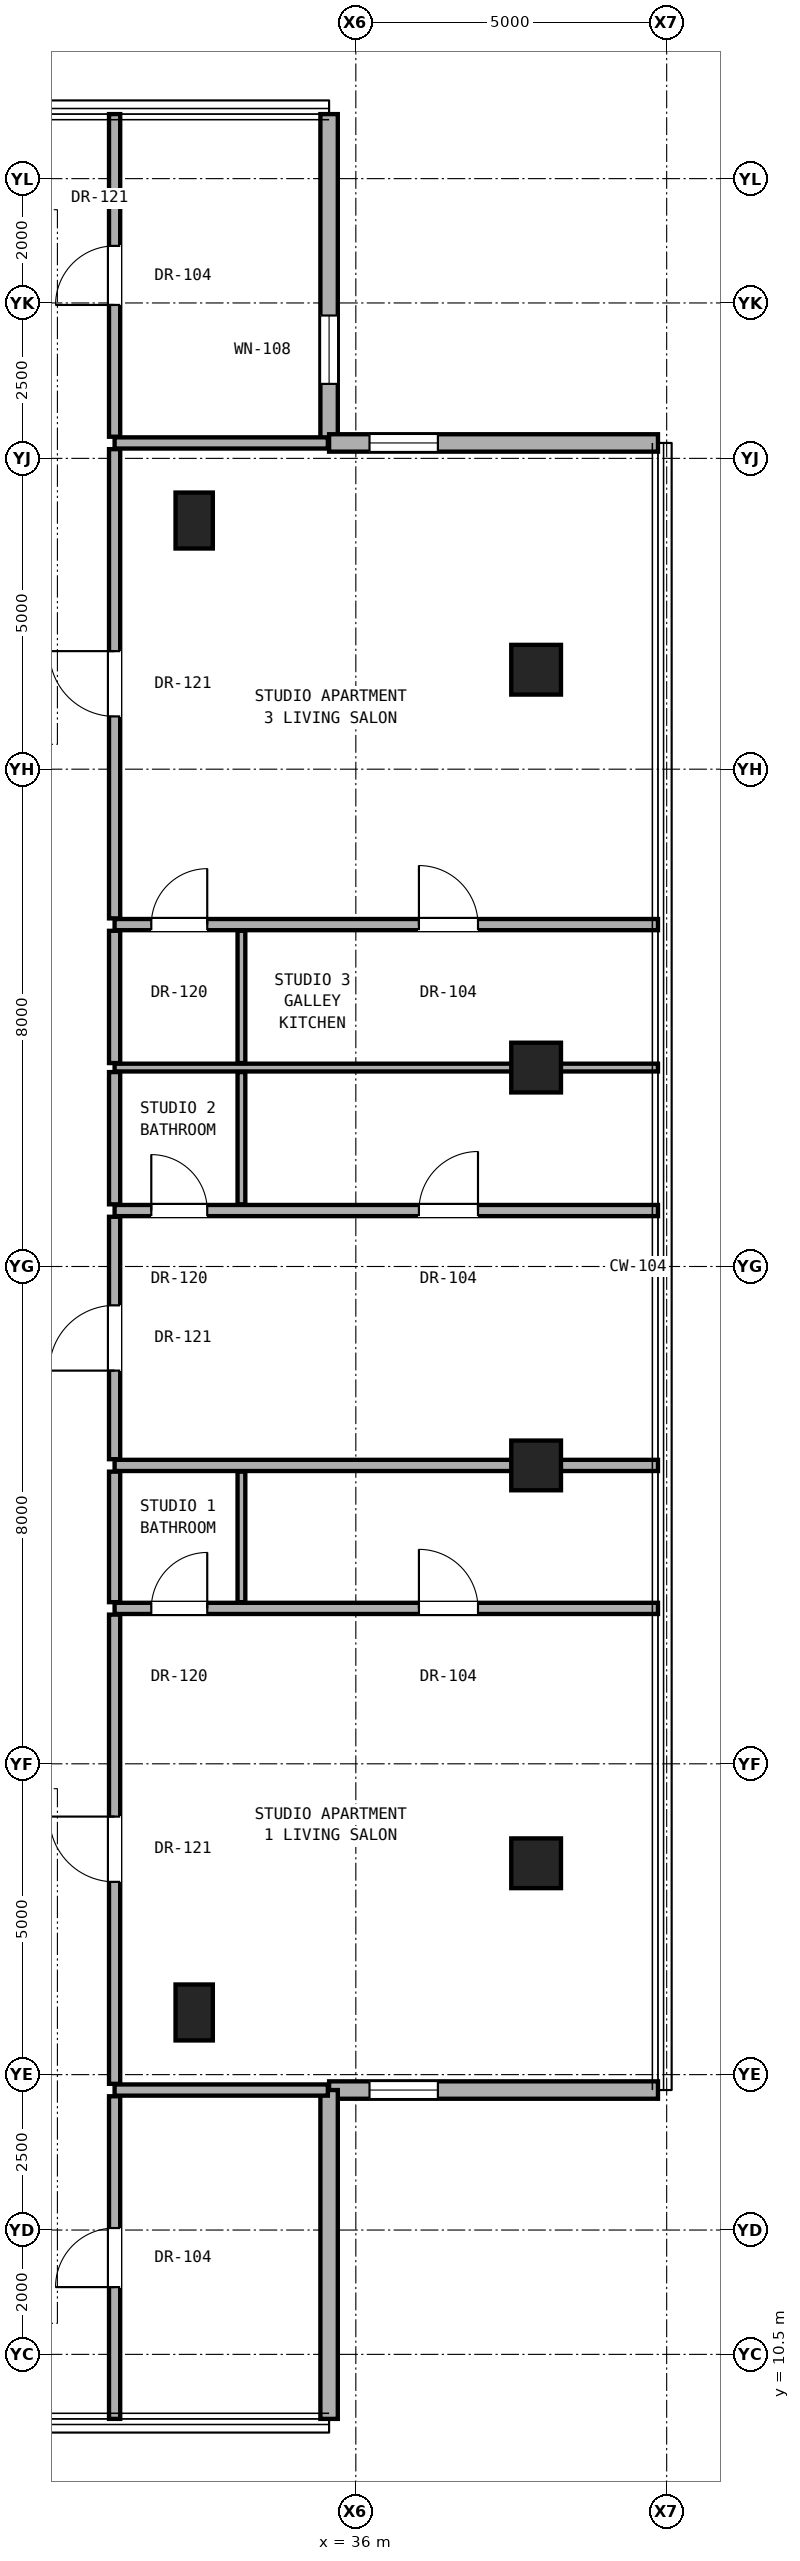
"""IFC4 building model, lengths in metres.
Left out: names, types, materials, properties, quantities, classifications, styles, units other than length and angle.
Written with IfcOpenShell. Run it as: python <this file> out.ifc"""

import sys

from ifc_helpers import new_model, si_unit, direction, frame, frame_2d, origin, origin_2d, place, context, subcontext, project, spatial, rectangle, hollow_rectangle, extrude, element, fill, save


model = new_model("IFC4")
c1 = context("Model", 3, precision=1e-05, world=origin(), true_north=direction((0.0, 1.0)))
c2 = subcontext(c1, "Body", "Model", "MODEL_VIEW")
j1 = project(units=[si_unit("LENGTHUNIT", "METRE"), si_unit("PLANEANGLEUNIT", "RADIAN")], contexts=[c1])
p1 = place(None, origin())
s1 = spatial("IfcSite", under=j1, at=p1, CompositionType="ELEMENT")
p2 = place(p1, origin())
s2 = spatial("IfcBuilding", under=s1, at=p2, CompositionType="ELEMENT")
p3 = place(p2, frame((0.0, 0.0, 222.7)))
s3 = spatial("IfcBuildingStorey", under=s2, at=p3, CompositionType="ELEMENT", Elevation=222.7)
for number, where, z_axis, x_axis in (
    (1, (38.9, 18.4, 0.0), (0.0, 0.0, 1.0), (1.0, 0.0, 0.0)),
    (2, (38.9, 24.8, 0.0), (0.0, 0.0, 1.0), (1.0, 0.0, 0.0)),
    (3, (38.9, 31.2, 0.0), (0.0, 0.0, 1.0), (1.0, 0.0, 0.0)),
    (4, (38.9, 37.6, 0.0), (0.0, 0.0, 1.0), (1.0, 0.0, 0.0)),
):
    element("IfcColumn", number, at=place(p3, frame(where, z_axis=z_axis, x_axis=x_axis)), inside=s3, PredefinedType="COLUMN", context=c2, shape_type="SweptSolid", body=[
        extrude(hollow_rectangle(XDim=0.8, YDim=0.8, WallThickness=0.045, at=origin_2d()), origin(), (0.0, 0.0, 1.0), 3.3),
    ])
for number, where, z_axis, x_axis in (
    (5, (33.4, 16.0, 0.0), (0.0, 0.0, 1.0), (1.0, 0.0, 0.0)),
    (6, (33.4, 40.0, 0.0), (0.0, 0.0, 1.0), (1.0, 0.0, 0.0)),
):
    element("IfcColumn", number, at=place(p3, frame(where, z_axis=z_axis, x_axis=x_axis)), inside=s3, PredefinedType="PILASTER", context=c2, shape_type="SweptSolid", body=[
        extrude(rectangle(XDim=0.6, YDim=0.9, at=origin_2d()), origin(), (0.0, 0.0, 1.0), 3.3),
    ])
p4 = place(p3, frame((35.57, 41.248, 0.0), z_axis=(0.0, 0.0, 1.0), x_axis=(0.0, 1.0, 0.0)))
e7 = element("IfcWall", 7, at=p4, inside=s3, PredefinedType="SOLIDWALL", context=c2, shape_type="SweptSolid", body=[
    extrude(rectangle(XDim=5.29, YDim=0.28, at=frame_2d((2.645, 0.0))), origin(), (0.0, 0.0, 1.0), 3.08),
])
p5 = place(p4, frame((0.95, 0.0, 0.85)))
e8 = element("IfcOpeningElement", 8, at=p5, cuts=e7, PredefinedType="OPENING", context=c2, shape_type="SweptSolid", body=[
    extrude(rectangle(XDim=1.1, YDim=2.0, at=frame_2d((0.55, 1.0))), frame((0.0, 0.15, 0.0), z_axis=(0.0, -1.0, 0.0), x_axis=(1.0, 0.0, 0.0)), (0.0, 0.0, 1.0), 0.3),
])
p6 = place(p3, frame((35.57, 14.752, 0.0), z_axis=(0.0, 0.0, 1.0), x_axis=(1.0, 0.0, 0.0)))
e9 = element("IfcWall", 9, at=p6, inside=s3, PredefinedType="SOLIDWALL", context=c2, shape_type="SweptSolid", body=[
    extrude(rectangle(XDim=5.29, YDim=0.28, at=frame_2d((2.645, 0.0))), origin(), (0.0, 0.0, 1.0), 3.08),
])
p7 = place(p6, frame((0.65, 0.0, 0.85)))
e10 = element("IfcOpeningElement", 10, at=p7, cuts=e9, PredefinedType="OPENING", context=c2, shape_type="SweptSolid", body=[
    extrude(rectangle(XDim=1.1, YDim=2.0, at=frame_2d((0.55, 1.0))), frame((0.0, 0.15, 0.0), z_axis=(0.0, -1.0, 0.0), x_axis=(1.0, 0.0, 0.0)), (0.0, 0.0, 1.0), 0.3),
])
p8 = place(p3, frame((35.57, 9.462, 0.0), z_axis=(0.0, 0.0, 1.0), x_axis=(0.0, 1.0, 0.0)))
e11 = element("IfcWall", 11, at=p8, inside=s3, PredefinedType="SOLIDWALL", context=c2, shape_type="SweptSolid", body=[
    extrude(rectangle(XDim=5.29, YDim=0.28, at=frame_2d((2.645, 0.0))), origin(), (0.0, 0.0, 1.0), 3.08),
])
p9 = place(p3, frame((40.86, 41.248, 0.0), z_axis=(0.0, 0.0, 1.0), x_axis=(-1.0, 0.0, 0.0)))
e12 = element("IfcWall", 12, at=p9, inside=s3, PredefinedType="SOLIDWALL", context=c2, shape_type="SweptSolid", body=[
    extrude(rectangle(XDim=5.29, YDim=0.28, at=frame_2d((2.645, 0.0))), origin(), (0.0, 0.0, 1.0), 3.08),
])
p10 = place(p9, frame((3.54, 0.0, 0.85)))
e13 = element("IfcOpeningElement", 13, at=p10, cuts=e12, PredefinedType="OPENING", context=c2, shape_type="SweptSolid", body=[
    extrude(rectangle(XDim=1.1, YDim=2.0, at=frame_2d((0.55, 1.0))), frame((0.0, 0.15, 0.0), z_axis=(0.0, -1.0, 0.0), x_axis=(1.0, 0.0, 0.0)), (0.0, 0.0, 1.0), 0.3),
])
p11 = place(p3, frame((32.12, 14.752, 0.0), z_axis=(0.0, 0.0, 1.0), x_axis=(1.0, 0.0, 0.0)))
e14 = element("IfcWall", 14, at=p11, inside=s3, PredefinedType="PARTITIONING", context=c2, shape_type="SweptSolid", body=[
    extrude(rectangle(XDim=3.43, YDim=0.18, at=frame_2d((1.715, 0.0))), origin(), (0.0, 0.0, 1.0), 3.1),
])
p12 = place(p3, frame((32.12, 22.5, 0.0), z_axis=(0.0, 0.0, 1.0), x_axis=(1.0, 0.0, 0.0)))
e15 = element("IfcWall", 15, at=p12, inside=s3, PredefinedType="PARTITIONING", context=c2, shape_type="SweptSolid", body=[
    extrude(rectangle(XDim=8.74, YDim=0.18, at=frame_2d((4.37, 0.0))), origin(), (0.0, 0.0, 1.0), 2.319),
])
p13 = place(p12, frame((4.895, 0.0, 0.0)))
e16 = element("IfcOpeningElement", 16, at=p13, cuts=e15, PredefinedType="OPENING", context=c2, shape_type="SweptSolid", body=[
    extrude(rectangle(XDim=0.95, YDim=2.15, at=frame_2d((0.475, 1.075))), frame((0.0, 0.1, 0.0), z_axis=(0.0, -1.0, 0.0), x_axis=(1.0, 0.0, 0.0)), (0.0, 0.0, 1.0), 0.2),
])
p14 = place(p12, frame((0.59, 0.0, 0.0)))
e17 = element("IfcOpeningElement", 17, at=p14, cuts=e15, PredefinedType="OPENING", context=c2, shape_type="SweptSolid", body=[
    extrude(rectangle(XDim=0.9, YDim=2.1, at=frame_2d((0.45, 1.05))), frame((0.0, 0.1, 0.0), z_axis=(0.0, -1.0, 0.0), x_axis=(1.0, 0.0, 0.0)), (0.0, 0.0, 1.0), 0.2),
])
p15 = place(p3, frame((32.12, 24.8, 0.0), z_axis=(0.0, 0.0, 1.0), x_axis=(1.0, 0.0, 0.0)))
e18 = element("IfcWall", 18, at=p15, inside=s3, PredefinedType="PARTITIONING", context=c2, shape_type="SweptSolid", body=[
    extrude(rectangle(XDim=8.74, YDim=0.18, at=frame_2d((4.37, 0.0))), origin(), (0.0, 0.0, 1.0), 2.319),
])
p16 = place(p3, frame((32.12, 28.9, 0.0), z_axis=(0.0, 0.0, 1.0), x_axis=(1.0, 0.0, 0.0)))
e19 = element("IfcWall", 19, at=p16, inside=s3, PredefinedType="PARTITIONING", context=c2, shape_type="SweptSolid", body=[
    extrude(rectangle(XDim=8.74, YDim=0.18, at=frame_2d((4.37, 0.0))), origin(), (0.0, 0.0, 1.0), 2.319),
])
p17 = place(p16, frame((4.895, 0.0, 0.0)))
e20 = element("IfcOpeningElement", 20, at=p17, cuts=e19, PredefinedType="OPENING", context=c2, shape_type="SweptSolid", body=[
    extrude(rectangle(XDim=0.95, YDim=2.15, at=frame_2d((0.475, 1.075))), frame((0.0, 0.1, 0.0), z_axis=(0.0, -1.0, 0.0), x_axis=(1.0, 0.0, 0.0)), (0.0, 0.0, 1.0), 0.2),
])
p18 = place(p16, frame((0.59, 0.0, 0.0)))
e21 = element("IfcOpeningElement", 21, at=p18, cuts=e19, PredefinedType="OPENING", context=c2, shape_type="SweptSolid", body=[
    extrude(rectangle(XDim=0.9, YDim=2.1, at=frame_2d((0.45, 1.05))), frame((0.0, 0.1, 0.0), z_axis=(0.0, -1.0, 0.0), x_axis=(1.0, 0.0, 0.0)), (0.0, 0.0, 1.0), 0.2),
])
p19 = place(p3, frame((32.12, 31.2, 0.0), z_axis=(0.0, 0.0, 1.0), x_axis=(1.0, 0.0, 0.0)))
e22 = element("IfcWall", 22, at=p19, inside=s3, PredefinedType="PARTITIONING", context=c2, shape_type="SweptSolid", body=[
    extrude(rectangle(XDim=8.74, YDim=0.125, at=frame_2d((4.37, 0.0))), origin(), (0.0, 0.0, 1.0), 2.319),
])
p20 = place(p3, frame((32.12, 33.5, 0.0), z_axis=(0.0, 0.0, 1.0), x_axis=(1.0, 0.0, 0.0)))
e23 = element("IfcWall", 23, at=p20, inside=s3, PredefinedType="PARTITIONING", context=c2, shape_type="SweptSolid", body=[
    extrude(rectangle(XDim=8.74, YDim=0.18, at=frame_2d((4.37, 0.0))), origin(), (0.0, 0.0, 1.0), 2.319),
])
p21 = place(p20, frame((4.895, 0.0, 0.0)))
e24 = element("IfcOpeningElement", 24, at=p21, cuts=e23, PredefinedType="OPENING", context=c2, shape_type="SweptSolid", body=[
    extrude(rectangle(XDim=0.95, YDim=2.15, at=frame_2d((0.475, 1.075))), frame((0.0, 0.1, 0.0), z_axis=(0.0, -1.0, 0.0), x_axis=(1.0, 0.0, 0.0)), (0.0, 0.0, 1.0), 0.2),
])
p22 = place(p20, frame((0.59, 0.0, 0.0)))
e25 = element("IfcOpeningElement", 25, at=p22, cuts=e23, PredefinedType="OPENING", context=c2, shape_type="SweptSolid", body=[
    extrude(rectangle(XDim=0.9, YDim=2.1, at=frame_2d((0.45, 1.05))), frame((0.0, 0.1, 0.0), z_axis=(0.0, -1.0, 0.0), x_axis=(1.0, 0.0, 0.0)), (0.0, 0.0, 1.0), 0.2),
])
p23 = place(p3, frame((32.12, 41.248, 0.0), z_axis=(0.0, 0.0, 1.0), x_axis=(1.0, 0.0, 0.0)))
e26 = element("IfcWall", 26, at=p23, inside=s3, PredefinedType="PARTITIONING", context=c2, shape_type="SweptSolid", body=[
    extrude(rectangle(XDim=3.43, YDim=0.18, at=frame_2d((1.715, 0.0))), origin(), (0.0, 0.0, 1.0), 3.1),
])
p24 = place(p3, frame((32.12, 9.462, 0.0), z_axis=(0.0, 0.0, 1.0), x_axis=(0.0, 1.0, 0.0)))
e27 = element("IfcWall", 27, at=p24, inside=s3, PredefinedType="PARTITIONING", context=c2, shape_type="SweptSolid", body=[
    extrude(rectangle(XDim=5.19, YDim=0.18, at=frame_2d((2.595, 0.0))), origin(), (0.0, 0.0, 1.0), 3.1),
])
p25 = place(p24, frame((2.12, 0.0, 0.0)))
e28 = element("IfcOpeningElement", 28, at=p25, cuts=e27, PredefinedType="OPENING", context=c2, shape_type="SweptSolid", body=[
    extrude(rectangle(XDim=0.95, YDim=2.15, at=frame_2d((0.475, 1.075))), frame((0.0, 0.1, 0.0), z_axis=(0.0, -1.0, 0.0), x_axis=(1.0, 0.0, 0.0)), (0.0, 0.0, 1.0), 0.2),
])
p26 = place(p3, frame((32.12, 14.852, 0.0), z_axis=(0.0, 0.0, 1.0), x_axis=(0.0, 1.0, 0.0)))
e29 = element("IfcWall", 29, at=p26, inside=s3, PredefinedType="PARTITIONING", context=c2, shape_type="SweptSolid", body=[
    extrude(rectangle(XDim=7.548, YDim=0.18, at=frame_2d((3.774, 0.0))), origin(), (0.0, 0.0, 1.0), 2.492),
])
p27 = place(p26, frame((3.249, 0.0, 0.0)))
e30 = element("IfcOpeningElement", 30, at=p27, cuts=e29, PredefinedType="OPENING", context=c2, shape_type="SweptSolid", body=[
    extrude(rectangle(XDim=1.05, YDim=2.2, at=frame_2d((0.525, 1.1))), frame((0.0, 0.1, 0.0), z_axis=(0.0, -1.0, 0.0), x_axis=(1.0, 0.0, 0.0)), (0.0, 0.0, 1.0), 0.2),
])
p28 = place(p3, frame((32.12, 22.6, 0.0), z_axis=(0.0, 0.0, 1.0), x_axis=(0.0, 1.0, 0.0)))
e31 = element("IfcWall", 31, at=p28, inside=s3, PredefinedType="PARTITIONING", context=c2, shape_type="SweptSolid", body=[
    extrude(rectangle(XDim=2.1, YDim=0.18, at=frame_2d((1.05, 0.0))), origin(), (0.0, 0.0, 1.0), 2.396),
])
p29 = place(p3, frame((32.12, 24.9, 0.0), z_axis=(0.0, 0.0, 1.0), x_axis=(0.0, 1.0, 0.0)))
e32 = element("IfcWall", 32, at=p29, inside=s3, PredefinedType="PARTITIONING", context=c2, shape_type="SweptSolid", body=[
    extrude(rectangle(XDim=3.9, YDim=0.18, at=frame_2d((1.95, 0.0))), origin(), (0.0, 0.0, 1.0), 2.396),
])
p30 = place(p29, frame((1.425, 0.0, 0.0)))
e33 = element("IfcOpeningElement", 33, at=p30, cuts=e32, PredefinedType="OPENING", context=c2, shape_type="SweptSolid", body=[
    extrude(rectangle(XDim=1.05, YDim=2.2, at=frame_2d((0.525, 1.1))), frame((0.0, 0.1, 0.0), z_axis=(0.0, -1.0, 0.0), x_axis=(1.0, 0.0, 0.0)), (0.0, 0.0, 1.0), 0.2),
])
for number, where, z_axis, x_axis in (
    (34, (32.12, 29.0, 0.0), (0.0, 0.0, 1.0), (0.0, 1.0, 0.0)),
    (35, (32.12, 31.272, 0.0), (0.0, 0.0, 1.0), (0.0, 1.0, 0.0)),
):
    element("IfcWall", number, at=place(p3, frame(where, z_axis=z_axis, x_axis=x_axis)), inside=s3, PredefinedType="PARTITIONING", context=c2, shape_type="SweptSolid", body=[
        extrude(rectangle(XDim=2.127, YDim=0.18, at=frame_2d((1.064, 0.0))), origin(), (0.0, 0.0, 1.0), 2.396),
    ])
p31 = place(p3, frame((32.12, 33.6, 0.0), z_axis=(0.0, 0.0, 1.0), x_axis=(0.0, 1.0, 0.0)))
e36 = element("IfcWall", 36, at=p31, inside=s3, PredefinedType="PARTITIONING", context=c2, shape_type="SweptSolid", body=[
    extrude(rectangle(XDim=7.548, YDim=0.18, at=frame_2d((3.774, 0.0))), origin(), (0.0, 0.0, 1.0), 2.492),
])
p32 = place(p31, frame((3.249, 0.0, 0.0)))
e37 = element("IfcOpeningElement", 37, at=p32, cuts=e36, PredefinedType="OPENING", context=c2, shape_type="SweptSolid", body=[
    extrude(rectangle(XDim=1.05, YDim=2.2, at=frame_2d((0.525, 1.1))), frame((0.0, 0.1, 0.0), z_axis=(0.0, -1.0, 0.0), x_axis=(1.0, 0.0, 0.0)), (0.0, 0.0, 1.0), 0.2),
])
p33 = place(p3, frame((32.12, 41.348, 0.0), z_axis=(0.0, 0.0, 1.0), x_axis=(0.0, 1.0, 0.0)))
e38 = element("IfcWall", 38, at=p33, inside=s3, PredefinedType="PARTITIONING", context=c2, shape_type="SweptSolid", body=[
    extrude(rectangle(XDim=5.19, YDim=0.18, at=frame_2d((2.595, 0.0))), origin(), (0.0, 0.0, 1.0), 3.1),
])
p34 = place(p33, frame((2.12, 0.0, 0.0)))
e39 = element("IfcOpeningElement", 39, at=p34, cuts=e38, PredefinedType="OPENING", context=c2, shape_type="SweptSolid", body=[
    extrude(rectangle(XDim=0.95, YDim=2.15, at=frame_2d((0.475, 1.075))), frame((0.0, 0.1, 0.0), z_axis=(0.0, -1.0, 0.0), x_axis=(1.0, 0.0, 0.0)), (0.0, 0.0, 1.0), 0.2),
])
p35 = place(p3, frame((34.16, 22.6, 0.0), z_axis=(0.0, 0.0, 1.0), x_axis=(0.0, 1.0, 0.0)))
e40 = element("IfcWall", 40, at=p35, inside=s3, PredefinedType="PARTITIONING", context=c2, shape_type="SweptSolid", body=[
    extrude(rectangle(XDim=2.1, YDim=0.125, at=frame_2d((1.05, 0.0))), origin(), (0.0, 0.0, 1.0), 2.396),
])
for number, where, z_axis, x_axis in (
    (41, (34.16, 29.0, 0.0), (0.0, 0.0, 1.0), (0.0, 1.0, 0.0)),
    (42, (34.16, 31.272, 0.0), (0.0, 0.0, 1.0), (0.0, 1.0, 0.0)),
):
    element("IfcWall", number, at=place(p3, frame(where, z_axis=z_axis, x_axis=x_axis)), inside=s3, PredefinedType="PARTITIONING", context=c2, shape_type="SweptSolid", body=[
        extrude(rectangle(XDim=2.127, YDim=0.125, at=frame_2d((1.064, 0.0))), origin(), (0.0, 0.0, 1.0), 2.396),
    ])
p36 = place(p5, origin())
e43 = element("IfcWindow", 43, at=p36, inside=s3, PartitioningType="SINGLE_PANEL", PredefinedType="WINDOW", context=c2, shape_type="SweptSolid", body=[
    extrude(rectangle(XDim=1.1, YDim=2.0, at=frame_2d((0.55, 1.0))), frame((0.0, 0.03, 0.0), z_axis=(0.0, -1.0, 0.0), x_axis=(1.0, 0.0, 0.0)), (0.0, 0.0, 1.0), 0.06),
])
fill(e8, e43)
p37 = place(p7, origin())
e44 = element("IfcWindow", 44, at=p37, inside=s3, PartitioningType="SINGLE_PANEL", PredefinedType="WINDOW", context=c2, shape_type="SweptSolid", body=[
    extrude(rectangle(XDim=1.1, YDim=2.0, at=frame_2d((0.55, 1.0))), frame((0.0, 0.03, 0.0), z_axis=(0.0, -1.0, 0.0), x_axis=(1.0, 0.0, 0.0)), (0.0, 0.0, 1.0), 0.06),
])
fill(e10, e44)
p38 = place(p10, origin())
e45 = element("IfcWindow", 45, at=p38, inside=s3, PartitioningType="SINGLE_PANEL", PredefinedType="WINDOW", context=c2, shape_type="SweptSolid", body=[
    extrude(rectangle(XDim=1.1, YDim=2.0, at=frame_2d((0.55, 1.0))), frame((0.0, 0.03, 0.0), z_axis=(0.0, -1.0, 0.0), x_axis=(1.0, 0.0, 0.0)), (0.0, 0.0, 1.0), 0.06),
])
fill(e13, e45)
p39 = place(p27, origin())
e46 = element("IfcDoor", 46, at=p39, inside=s3, OperationType="SINGLE_SWING_RIGHT", PredefinedType="DOOR", context=c2, shape_type="SweptSolid", body=[
    extrude(rectangle(XDim=1.05, YDim=2.2, at=frame_2d((0.525, 1.1))), frame((0.0, 0.025, 0.0), z_axis=(0.0, -1.0, 0.0), x_axis=(1.0, 0.0, 0.0)), (0.0, 0.0, 1.0), 0.05),
])
fill(e30, e46)
p40 = place(p13, origin())
e47 = element("IfcDoor", 47, at=p40, inside=s3, OperationType="SINGLE_SWING_LEFT", PredefinedType="DOOR", context=c2, shape_type="SweptSolid", body=[
    extrude(rectangle(XDim=0.95, YDim=2.15, at=frame_2d((0.475, 1.075))), frame((0.0, 0.025, 0.0), z_axis=(0.0, -1.0, 0.0), x_axis=(1.0, 0.0, 0.0)), (0.0, 0.0, 1.0), 0.05),
])
fill(e16, e47)
p41 = place(p14, origin())
e48 = element("IfcDoor", 48, at=p41, inside=s3, OperationType="SINGLE_SWING_RIGHT", PredefinedType="DOOR", context=c2, shape_type="SweptSolid", body=[
    extrude(rectangle(XDim=0.9, YDim=2.1, at=frame_2d((0.45, 1.05))), frame((0.0, 0.025, 0.0), z_axis=(0.0, -1.0, 0.0), x_axis=(1.0, 0.0, 0.0)), (0.0, 0.0, 1.0), 0.05),
])
fill(e17, e48)
p42 = place(p30, origin())
e49 = element("IfcDoor", 49, at=p42, inside=s3, OperationType="SINGLE_SWING_LEFT", PredefinedType="DOOR", context=c2, shape_type="SweptSolid", body=[
    extrude(rectangle(XDim=1.05, YDim=2.2, at=frame_2d((0.525, 1.1))), frame((0.0, 0.025, 0.0), z_axis=(0.0, -1.0, 0.0), x_axis=(1.0, 0.0, 0.0)), (0.0, 0.0, 1.0), 0.05),
])
fill(e33, e49)
p43 = place(p17, origin())
e50 = element("IfcDoor", 50, at=p43, inside=s3, OperationType="SINGLE_SWING_RIGHT", PredefinedType="DOOR", context=c2, shape_type="SweptSolid", body=[
    extrude(rectangle(XDim=0.95, YDim=2.15, at=frame_2d((0.475, 1.075))), frame((0.0, 0.025, 0.0), z_axis=(0.0, -1.0, 0.0), x_axis=(1.0, 0.0, 0.0)), (0.0, 0.0, 1.0), 0.05),
])
fill(e20, e50)
p44 = place(p18, origin())
e51 = element("IfcDoor", 51, at=p44, inside=s3, OperationType="SINGLE_SWING_LEFT", PredefinedType="DOOR", context=c2, shape_type="SweptSolid", body=[
    extrude(rectangle(XDim=0.9, YDim=2.1, at=frame_2d((0.45, 1.05))), frame((0.0, 0.025, 0.0), z_axis=(0.0, -1.0, 0.0), x_axis=(1.0, 0.0, 0.0)), (0.0, 0.0, 1.0), 0.05),
])
fill(e21, e51)
p45 = place(p32, origin())
e52 = element("IfcDoor", 52, at=p45, inside=s3, OperationType="SINGLE_SWING_RIGHT", PredefinedType="DOOR", context=c2, shape_type="SweptSolid", body=[
    extrude(rectangle(XDim=1.05, YDim=2.2, at=frame_2d((0.525, 1.1))), frame((0.0, 0.025, 0.0), z_axis=(0.0, -1.0, 0.0), x_axis=(1.0, 0.0, 0.0)), (0.0, 0.0, 1.0), 0.05),
])
fill(e37, e52)
p46 = place(p21, origin())
e53 = element("IfcDoor", 53, at=p46, inside=s3, OperationType="SINGLE_SWING_LEFT", PredefinedType="DOOR", context=c2, shape_type="SweptSolid", body=[
    extrude(rectangle(XDim=0.95, YDim=2.15, at=frame_2d((0.475, 1.075))), frame((0.0, 0.025, 0.0), z_axis=(0.0, -1.0, 0.0), x_axis=(1.0, 0.0, 0.0)), (0.0, 0.0, 1.0), 0.05),
])
fill(e24, e53)
p47 = place(p22, origin())
e54 = element("IfcDoor", 54, at=p47, inside=s3, OperationType="SINGLE_SWING_RIGHT", PredefinedType="DOOR", context=c2, shape_type="SweptSolid", body=[
    extrude(rectangle(XDim=0.9, YDim=2.1, at=frame_2d((0.45, 1.05))), frame((0.0, 0.025, 0.0), z_axis=(0.0, -1.0, 0.0), x_axis=(1.0, 0.0, 0.0)), (0.0, 0.0, 1.0), 0.05),
])
fill(e25, e54)
p48 = place(p25, origin())
e55 = element("IfcDoor", 55, at=p48, inside=s3, OperationType="SINGLE_SWING_LEFT", PredefinedType="DOOR", context=c2, shape_type="SweptSolid", body=[
    extrude(rectangle(XDim=0.95, YDim=2.15, at=frame_2d((0.475, 1.075))), frame((0.0, 0.025, 0.0), z_axis=(0.0, -1.0, 0.0), x_axis=(1.0, 0.0, 0.0)), (0.0, 0.0, 1.0), 0.05),
])
fill(e28, e55)
p49 = place(p34, origin())
e56 = element("IfcDoor", 56, at=p49, inside=s3, OperationType="SINGLE_SWING_LEFT", PredefinedType="DOOR", context=c2, shape_type="SweptSolid", body=[
    extrude(rectangle(XDim=0.95, YDim=2.15, at=frame_2d((0.475, 1.075))), frame((0.0, 0.025, 0.0), z_axis=(0.0, -1.0, 0.0), x_axis=(1.0, 0.0, 0.0)), (0.0, 0.0, 1.0), 0.05),
])
fill(e39, e56)
save(model, sys.argv[1])
